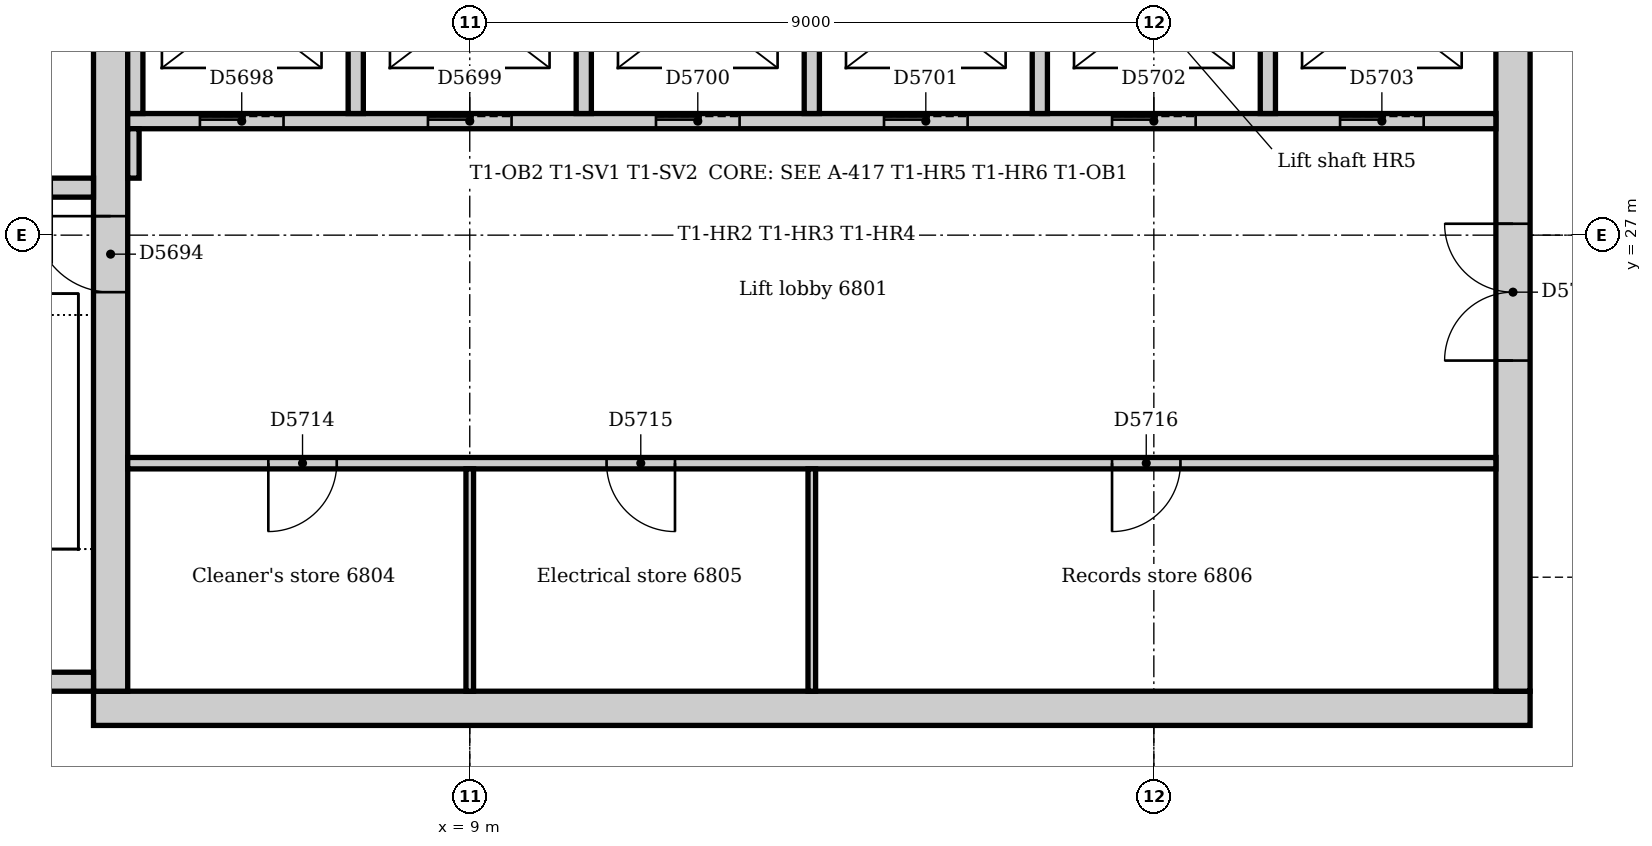
"""IFC4 building model, lengths in metres.
Left out: names, types, materials, properties, quantities, classifications, styles, units other than length and angle.
Written with IfcOpenShell. Run it as: python <this file> out.ifc"""

import sys

from ifc_helpers import new_model, si_unit, direction, frame, frame_2d, origin, place, context, subcontext, project, spatial, rectangle, extrude, element, fill, save


model = new_model("IFC4")
c1 = context("Model", 3, precision=1e-05, world=origin(), true_north=direction((0.0, 1.0)))
c2 = subcontext(c1, "Body", "Model", "MODEL_VIEW")
j1 = project(units=[si_unit("LENGTHUNIT", "METRE"), si_unit("PLANEANGLEUNIT", "RADIAN")], contexts=[c1])
p1 = place(None, origin())
s1 = spatial("IfcSite", under=j1, at=p1, CompositionType="ELEMENT")
p2 = place(p1, origin())
s2 = spatial("IfcBuilding", under=s1, at=p2, CompositionType="ELEMENT")
p3 = place(p2, frame((0.0, 0.0, 283.0)))
s3 = spatial("IfcBuildingStorey", under=s2, at=p3, CompositionType="ELEMENT", Elevation=283.0)
p4 = place(p3, frame((4.05, 20.775, 0.0), z_axis=(0.0, 0.0, 1.0), x_axis=(1.0, 0.0, 0.0)))
e1 = element("IfcWall", 1, at=p4, inside=s3, PredefinedType="SOLIDWALL", context=c2, shape_type="SweptSolid", body=[
    extrude(rectangle(XDim=18.9, YDim=0.45, at=frame_2d((9.45, 0.0))), origin(), (0.0, 0.0, 1.0), 8.0),
])
p5 = place(p3, frame((22.725, 21.0, 0.0), z_axis=(0.0, 0.0, 1.0), x_axis=(0.0, 1.0, 0.0)))
e2 = element("IfcWall", 2, at=p5, inside=s3, PredefinedType="SOLIDWALL", context=c2, shape_type="SweptSolid", body=[
    extrude(rectangle(XDim=10.5, YDim=0.45, at=frame_2d((5.25, 0.0))), origin(), (0.0, 0.0, 1.0), 8.0),
])
p6 = place(p5, frame((4.35, 0.0, 0.0)))
e3 = element("IfcOpeningElement", 3, at=p6, cuts=e2, PredefinedType="OPENING", context=c2, shape_type="SweptSolid", body=[
    extrude(rectangle(XDim=1.8, YDim=2.1, at=frame_2d((0.9, 1.05))), frame((0.0, 0.235, 0.0), z_axis=(0.0, -1.0, 0.0), x_axis=(1.0, 0.0, 0.0)), (0.0, 0.0, 1.0), 0.47),
])
p7 = place(p3, frame((4.275, 31.5, 0.0), z_axis=(0.0, 0.0, 1.0), x_axis=(0.0, -1.0, 0.0)))
e4 = element("IfcWall", 4, at=p7, inside=s3, PredefinedType="SOLIDWALL", context=c2, shape_type="SweptSolid", body=[
    extrude(rectangle(XDim=10.5, YDim=0.45, at=frame_2d((5.25, 0.0))), origin(), (0.0, 0.0, 1.0), 8.0),
])
p8 = place(p7, frame((4.25, 0.0, 0.0)))
e5 = element("IfcOpeningElement", 5, at=p8, cuts=e4, PredefinedType="OPENING", context=c2, shape_type="SweptSolid", body=[
    extrude(rectangle(XDim=1.0, YDim=2.1, at=frame_2d((0.5, 1.05))), frame((0.0, 0.235, 0.0), z_axis=(0.0, -1.0, 0.0), x_axis=(1.0, 0.0, 0.0)), (0.0, 0.0, 1.0), 0.47),
])
p9 = place(p3, frame((0.36, 21.125, 0.0), z_axis=(0.0, 0.0, 1.0), x_axis=(1.0, 0.0, 0.0)))
e6 = element("IfcWall", 6, at=p9, inside=s3, PredefinedType="SOLIDWALL", context=c2, shape_type="SweptSolid", body=[
    extrude(rectangle(XDim=3.69, YDim=0.25, at=frame_2d((1.845, 0.0))), origin(), (0.0, 0.0, 1.0), 8.0),
])
p10 = place(p3, frame((4.05, 27.625, 0.0), z_axis=(0.0, 0.0, 1.0), x_axis=(-1.0, 0.0, 0.0)))
e7 = element("IfcWall", 7, at=p10, inside=s3, PredefinedType="SOLIDWALL", context=c2, shape_type="SweptSolid", body=[
    extrude(rectangle(XDim=3.69, YDim=0.25, at=frame_2d((1.845, 0.0))), origin(), (0.0, 0.0, 1.0), 8.0),
])
p11 = place(p10, frame((0.55, 0.0, 0.0)))
e8 = element("IfcOpeningElement", 8, at=p11, cuts=e7, PredefinedType="OPENING", context=c2, shape_type="SweptSolid", body=[
    extrude(rectangle(XDim=1.0, YDim=2.1, at=frame_2d((0.5, 1.05))), frame((0.0, 0.135, 0.0), z_axis=(0.0, -1.0, 0.0), x_axis=(1.0, 0.0, 0.0)), (0.0, 0.0, 1.0), 0.27),
])
p12 = place(p3, frame((4.5, 28.5, 0.0), z_axis=(0.0, 0.0, 1.0), x_axis=(1.0, 0.0, 0.0)))
e9 = element("IfcWall", 9, at=p12, inside=s3, PredefinedType="PARTITIONING", context=c2, shape_type="SweptSolid", body=[
    extrude(rectangle(XDim=18.0, YDim=0.2, at=frame_2d((9.0, 0.0))), origin(), (0.0, 0.0, 1.0), 7.7),
])
p13 = place(p12, frame((0.95, 0.0, 0.0)))
e10 = element("IfcOpeningElement", 10, at=p13, cuts=e9, PredefinedType="OPENING", context=c2, shape_type="SweptSolid", body=[
    extrude(rectangle(XDim=1.1, YDim=2.1, at=frame_2d((0.55, 1.05))), frame((0.0, 0.11, 0.0), z_axis=(0.0, -1.0, 0.0), x_axis=(1.0, 0.0, 0.0)), (0.0, 0.0, 1.0), 0.22),
])
p14 = place(p12, frame((3.95, 0.0, 0.0)))
e11 = element("IfcOpeningElement", 11, at=p14, cuts=e9, PredefinedType="OPENING", context=c2, shape_type="SweptSolid", body=[
    extrude(rectangle(XDim=1.1, YDim=2.1, at=frame_2d((0.55, 1.05))), frame((0.0, 0.11, 0.0), z_axis=(0.0, -1.0, 0.0), x_axis=(1.0, 0.0, 0.0)), (0.0, 0.0, 1.0), 0.22),
])
p15 = place(p12, frame((6.95, 0.0, 0.0)))
e12 = element("IfcOpeningElement", 12, at=p15, cuts=e9, PredefinedType="OPENING", context=c2, shape_type="SweptSolid", body=[
    extrude(rectangle(XDim=1.1, YDim=2.1, at=frame_2d((0.55, 1.05))), frame((0.0, 0.11, 0.0), z_axis=(0.0, -1.0, 0.0), x_axis=(1.0, 0.0, 0.0)), (0.0, 0.0, 1.0), 0.22),
])
p16 = place(p12, frame((9.95, 0.0, 0.0)))
e13 = element("IfcOpeningElement", 13, at=p16, cuts=e9, PredefinedType="OPENING", context=c2, shape_type="SweptSolid", body=[
    extrude(rectangle(XDim=1.1, YDim=2.1, at=frame_2d((0.55, 1.05))), frame((0.0, 0.11, 0.0), z_axis=(0.0, -1.0, 0.0), x_axis=(1.0, 0.0, 0.0)), (0.0, 0.0, 1.0), 0.22),
])
p17 = place(p12, frame((12.95, 0.0, 0.0)))
e14 = element("IfcOpeningElement", 14, at=p17, cuts=e9, PredefinedType="OPENING", context=c2, shape_type="SweptSolid", body=[
    extrude(rectangle(XDim=1.1, YDim=2.1, at=frame_2d((0.55, 1.05))), frame((0.0, 0.11, 0.0), z_axis=(0.0, -1.0, 0.0), x_axis=(1.0, 0.0, 0.0)), (0.0, 0.0, 1.0), 0.22),
])
p18 = place(p12, frame((15.95, 0.0, 0.0)))
e15 = element("IfcOpeningElement", 15, at=p18, cuts=e9, PredefinedType="OPENING", context=c2, shape_type="SweptSolid", body=[
    extrude(rectangle(XDim=1.1, YDim=2.1, at=frame_2d((0.55, 1.05))), frame((0.0, 0.11, 0.0), z_axis=(0.0, -1.0, 0.0), x_axis=(1.0, 0.0, 0.0)), (0.0, 0.0, 1.0), 0.22),
])
for number, where, z_axis, x_axis in (
    (16, (10.5, 28.6, 0.0), (0.0, 0.0, 1.0), (0.0, 1.0, 0.0)),
    (17, (13.5, 28.6, 0.0), (0.0, 0.0, 1.0), (0.0, 1.0, 0.0)),
    (18, (16.5, 28.6, 0.0), (0.0, 0.0, 1.0), (0.0, 1.0, 0.0)),
    (19, (19.5, 28.6, 0.0), (0.0, 0.0, 1.0), (0.0, 1.0, 0.0)),
    (20, (4.6, 28.6, 0.0), (0.0, 0.0, 1.0), (0.0, 1.0, 0.0)),
    (21, (7.5, 28.6, 0.0), (0.0, 0.0, 1.0), (0.0, 1.0, 0.0)),
):
    element("IfcWall", number, at=place(p3, frame(where, z_axis=z_axis, x_axis=x_axis)), inside=s3, PredefinedType="PARTITIONING", context=c2, shape_type="SweptSolid", body=[
        extrude(rectangle(XDim=2.65, YDim=0.2, at=frame_2d((1.325, 0.0))), origin(), (0.0, 0.0, 1.0), 7.7),
    ])
p19 = place(p3, frame((4.5, 24.0, 0.0), z_axis=(0.0, 0.0, 1.0), x_axis=(1.0, 0.0, 0.0)))
e22 = element("IfcWall", 22, at=p19, inside=s3, PredefinedType="PARTITIONING", context=c2, shape_type="SweptSolid", body=[
    extrude(rectangle(XDim=18.0, YDim=0.15, at=frame_2d((9.0, 0.0))), origin(), (0.0, 0.0, 1.0), 7.7),
])
p20 = place(p19, frame((1.85, 0.0, 0.0)))
e23 = element("IfcOpeningElement", 23, at=p20, cuts=e22, PredefinedType="OPENING", context=c2, shape_type="SweptSolid", body=[
    extrude(rectangle(XDim=0.9, YDim=2.1, at=frame_2d((0.45, 1.05))), frame((0.0, 0.085, 0.0), z_axis=(0.0, -1.0, 0.0), x_axis=(1.0, 0.0, 0.0)), (0.0, 0.0, 1.0), 0.17),
])
p21 = place(p19, frame((6.3, 0.0, 0.0)))
e24 = element("IfcOpeningElement", 24, at=p21, cuts=e22, PredefinedType="OPENING", context=c2, shape_type="SweptSolid", body=[
    extrude(rectangle(XDim=0.9, YDim=2.1, at=frame_2d((0.45, 1.05))), frame((0.0, 0.085, 0.0), z_axis=(0.0, -1.0, 0.0), x_axis=(1.0, 0.0, 0.0)), (0.0, 0.0, 1.0), 0.17),
])
p22 = place(p19, frame((12.95, 0.0, 0.0)))
e25 = element("IfcOpeningElement", 25, at=p22, cuts=e22, PredefinedType="OPENING", context=c2, shape_type="SweptSolid", body=[
    extrude(rectangle(XDim=0.9, YDim=2.1, at=frame_2d((0.45, 1.05))), frame((0.0, 0.085, 0.0), z_axis=(0.0, -1.0, 0.0), x_axis=(1.0, 0.0, 0.0)), (0.0, 0.0, 1.0), 0.17),
])
p23 = place(p3, frame((4.575, 27.75, 0.0), z_axis=(0.0, 0.0, 1.0), x_axis=(0.0, 1.0, 0.0)))
e26 = element("IfcWall", 26, at=p23, inside=s3, PredefinedType="PARTITIONING", context=c2, shape_type="SweptSolid", body=[
    extrude(rectangle(XDim=0.65, YDim=0.15, at=frame_2d((0.325, 0.0))), origin(), (0.0, 0.0, 1.0), 7.7),
])
for number, where, z_axis, x_axis in (
    (27, (9.0, 21.0, 0.0), (0.0, 0.0, 1.0), (0.0, 1.0, 0.0)),
    (28, (13.5, 21.0, 0.0), (0.0, 0.0, 1.0), (0.0, 1.0, 0.0)),
):
    element("IfcWall", number, at=place(p3, frame(where, z_axis=z_axis, x_axis=x_axis)), inside=s3, PredefinedType="PARTITIONING", context=c2, shape_type="SweptSolid", body=[
        extrude(rectangle(XDim=2.925, YDim=0.1, at=frame_2d((1.462, 0.0))), origin(), (0.0, 0.0, 1.0), 7.7),
    ])
p24 = place(p8, frame((1.0, 0.0, 0.0), z_axis=(0.0, 0.0, 1.0), x_axis=(-1.0, 0.0, 0.0)))
e29 = element("IfcDoor", 29, at=p24, inside=s3, OperationType="SINGLE_SWING_RIGHT", PredefinedType="DOOR", context=c2, shape_type="SweptSolid", body=[
    extrude(rectangle(XDim=1.0, YDim=2.1, at=frame_2d((0.5, 1.05))), frame((0.0, 0.025, 0.0), z_axis=(0.0, -1.0, 0.0), x_axis=(1.0, 0.0, 0.0)), (0.0, 0.0, 1.0), 0.05),
])
fill(e5, e29)
p25 = place(p13, origin())
e30 = element("IfcDoor", 30, at=p25, inside=s3, OperationType="SLIDING_TO_LEFT", PredefinedType="DOOR", context=c2, shape_type="SweptSolid", body=[
    extrude(rectangle(XDim=1.1, YDim=2.1, at=frame_2d((0.55, 1.05))), frame((0.0, 0.025, 0.0), z_axis=(0.0, -1.0, 0.0), x_axis=(1.0, 0.0, 0.0)), (0.0, 0.0, 1.0), 0.05),
])
fill(e10, e30)
p26 = place(p14, origin())
e31 = element("IfcDoor", 31, at=p26, inside=s3, OperationType="SLIDING_TO_LEFT", PredefinedType="DOOR", context=c2, shape_type="SweptSolid", body=[
    extrude(rectangle(XDim=1.1, YDim=2.1, at=frame_2d((0.55, 1.05))), frame((0.0, 0.025, 0.0), z_axis=(0.0, -1.0, 0.0), x_axis=(1.0, 0.0, 0.0)), (0.0, 0.0, 1.0), 0.05),
])
fill(e11, e31)
p27 = place(p15, origin())
e32 = element("IfcDoor", 32, at=p27, inside=s3, OperationType="SLIDING_TO_LEFT", PredefinedType="DOOR", context=c2, shape_type="SweptSolid", body=[
    extrude(rectangle(XDim=1.1, YDim=2.1, at=frame_2d((0.55, 1.05))), frame((0.0, 0.025, 0.0), z_axis=(0.0, -1.0, 0.0), x_axis=(1.0, 0.0, 0.0)), (0.0, 0.0, 1.0), 0.05),
])
fill(e12, e32)
p28 = place(p16, origin())
e33 = element("IfcDoor", 33, at=p28, inside=s3, OperationType="SLIDING_TO_LEFT", PredefinedType="DOOR", context=c2, shape_type="SweptSolid", body=[
    extrude(rectangle(XDim=1.1, YDim=2.1, at=frame_2d((0.55, 1.05))), frame((0.0, 0.025, 0.0), z_axis=(0.0, -1.0, 0.0), x_axis=(1.0, 0.0, 0.0)), (0.0, 0.0, 1.0), 0.05),
])
fill(e13, e33)
p29 = place(p17, origin())
e34 = element("IfcDoor", 34, at=p29, inside=s3, OperationType="SLIDING_TO_LEFT", PredefinedType="DOOR", context=c2, shape_type="SweptSolid", body=[
    extrude(rectangle(XDim=1.1, YDim=2.1, at=frame_2d((0.55, 1.05))), frame((0.0, 0.025, 0.0), z_axis=(0.0, -1.0, 0.0), x_axis=(1.0, 0.0, 0.0)), (0.0, 0.0, 1.0), 0.05),
])
fill(e14, e34)
p30 = place(p18, origin())
e35 = element("IfcDoor", 35, at=p30, inside=s3, OperationType="SLIDING_TO_LEFT", PredefinedType="DOOR", context=c2, shape_type="SweptSolid", body=[
    extrude(rectangle(XDim=1.1, YDim=2.1, at=frame_2d((0.55, 1.05))), frame((0.0, 0.025, 0.0), z_axis=(0.0, -1.0, 0.0), x_axis=(1.0, 0.0, 0.0)), (0.0, 0.0, 1.0), 0.05),
])
fill(e15, e35)
p31 = place(p6, origin())
e36 = element("IfcDoor", 36, at=p31, inside=s3, OperationType="DOUBLE_DOOR_DOUBLE_SWING", PredefinedType="DOOR", context=c2, shape_type="SweptSolid", body=[
    extrude(rectangle(XDim=1.8, YDim=2.1, at=frame_2d((0.9, 1.05))), frame((0.0, 0.025, 0.0), z_axis=(0.0, -1.0, 0.0), x_axis=(1.0, 0.0, 0.0)), (0.0, 0.0, 1.0), 0.05),
])
fill(e3, e36)
p32 = place(p20, frame((0.9, 0.0, 0.0), z_axis=(0.0, 0.0, 1.0), x_axis=(-1.0, 0.0, 0.0)))
e37 = element("IfcDoor", 37, at=p32, inside=s3, OperationType="SINGLE_SWING_RIGHT", PredefinedType="DOOR", context=c2, shape_type="SweptSolid", body=[
    extrude(rectangle(XDim=0.9, YDim=2.1, at=frame_2d((0.45, 1.05))), frame((0.0, 0.025, 0.0), z_axis=(0.0, -1.0, 0.0), x_axis=(1.0, 0.0, 0.0)), (0.0, 0.0, 1.0), 0.05),
])
fill(e23, e37)
p33 = place(p21, frame((0.9, 0.0, 0.0), z_axis=(0.0, 0.0, 1.0), x_axis=(-1.0, 0.0, 0.0)))
e38 = element("IfcDoor", 38, at=p33, inside=s3, OperationType="SINGLE_SWING_LEFT", PredefinedType="DOOR", context=c2, shape_type="SweptSolid", body=[
    extrude(rectangle(XDim=0.9, YDim=2.1, at=frame_2d((0.45, 1.05))), frame((0.0, 0.025, 0.0), z_axis=(0.0, -1.0, 0.0), x_axis=(1.0, 0.0, 0.0)), (0.0, 0.0, 1.0), 0.05),
])
fill(e24, e38)
p34 = place(p22, frame((0.9, 0.0, 0.0), z_axis=(0.0, 0.0, 1.0), x_axis=(-1.0, 0.0, 0.0)))
e39 = element("IfcDoor", 39, at=p34, inside=s3, OperationType="SINGLE_SWING_RIGHT", PredefinedType="DOOR", context=c2, shape_type="SweptSolid", body=[
    extrude(rectangle(XDim=0.9, YDim=2.1, at=frame_2d((0.45, 1.05))), frame((0.0, 0.025, 0.0), z_axis=(0.0, -1.0, 0.0), x_axis=(1.0, 0.0, 0.0)), (0.0, 0.0, 1.0), 0.05),
])
fill(e25, e39)
save(model, sys.argv[1])
